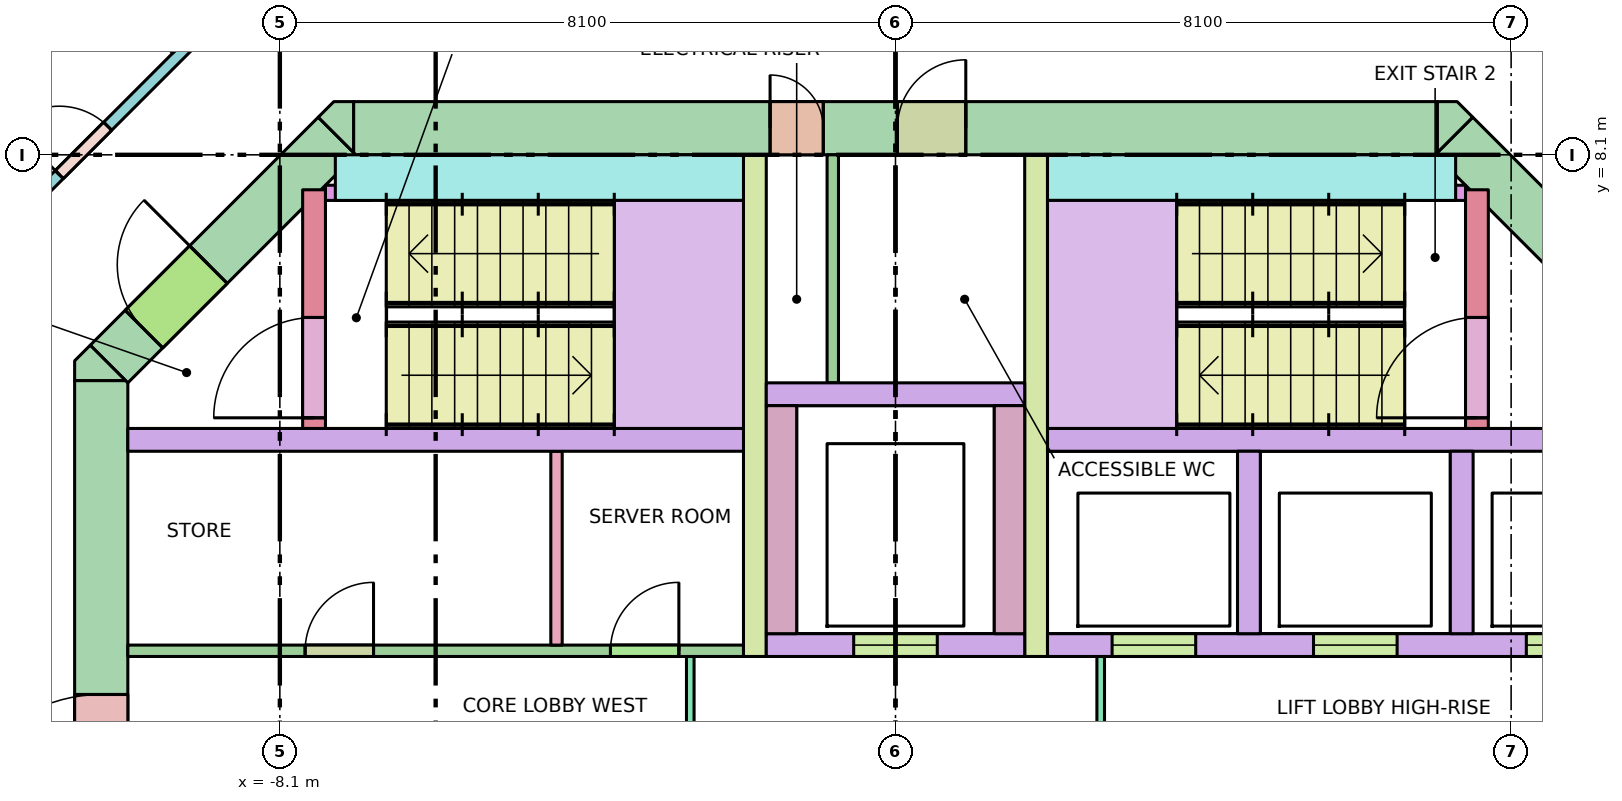
"""IFC4 building model, lengths in metres.
Left out: names, types, materials, properties, quantities, classifications, styles, units other than length and angle.
Written with IfcOpenShell. Run it as: python <this file> out.ifc"""

import sys

from ifc_helpers import new_model, si_unit, direction, frame, frame_2d, origin, place, context, subcontext, project, spatial, polyline, rectangle, outline, extrude, element, fill, save


model = new_model("IFC4")
c1 = context("Model", 3, precision=1e-05, world=origin(), true_north=direction((0.0, 1.0)))
c2 = subcontext(c1, "Body", "Model", "MODEL_VIEW")
j1 = project(units=[si_unit("LENGTHUNIT", "METRE"), si_unit("PLANEANGLEUNIT", "RADIAN")], contexts=[c1])
p1 = place(None, origin())
s1 = spatial("IfcSite", under=j1, at=p1, CompositionType="ELEMENT")
p2 = place(p1, origin())
s2 = spatial("IfcBuilding", under=s1, at=p2, CompositionType="ELEMENT")
p3 = place(p2, frame((0.0, 0.0, 192.8)))
s3 = spatial("IfcBuildingStorey", under=s2, at=p3, CompositionType="ELEMENT", Elevation=192.8)
p4 = place(p3, frame((-7.13, 8.45, -0.28), z_axis=(0.0, 0.0, 1.0), x_axis=(1.0, 0.0, 0.0)))
e1 = element("IfcWall", 1, at=p4, inside=s3, PredefinedType="SHEAR", context=c2, shape_type="SweptSolid", body=[
    extrude(rectangle(XDim=14.26, YDim=0.7, at=frame_2d((7.13, 0.0))), origin(), (0.0, 0.0, 1.0), 3.7),
])
p5 = place(p4, frame((5.48, 0.0, 0.28)))
e2 = element("IfcOpeningElement", 2, at=p5, cuts=e1, PredefinedType="OPENING", context=c2, shape_type="SweptSolid", body=[
    extrude(rectangle(XDim=0.7, YDim=2.1, at=frame_2d((0.35, 1.05))), frame((0.0, 0.36, 0.0), z_axis=(0.0, -1.0, 0.0), x_axis=(1.0, 0.0, 0.0)), (0.0, 0.0, 1.0), 0.72),
])
p6 = place(p4, frame((7.155, 0.0, 0.28)))
e3 = element("IfcOpeningElement", 3, at=p6, cuts=e1, PredefinedType="OPENING", context=c2, shape_type="SweptSolid", body=[
    extrude(rectangle(XDim=0.9, YDim=2.1, at=frame_2d((0.45, 1.05))), frame((0.0, 0.36, 0.0), z_axis=(0.0, -1.0, 0.0), x_axis=(1.0, 0.0, 0.0)), (0.0, 0.0, 1.0), 0.72),
])
p7 = place(p3, frame((-10.45, -5.13, -0.28), z_axis=(0.0, 0.0, 1.0), x_axis=(0.0, 1.0, 0.0)))
e4 = element("IfcWall", 4, at=p7, inside=s3, PredefinedType="SHEAR", context=c2, shape_type="SweptSolid", body=[
    extrude(rectangle(XDim=10.26, YDim=0.7, at=frame_2d((5.13, 0.0))), origin(), (0.0, 0.0, 1.0), 3.7),
])
p8 = place(p7, frame((4.13, 0.0, 0.28)))
e5 = element("IfcOpeningElement", 5, at=p8, cuts=e4, PredefinedType="OPENING", context=c2, shape_type="SweptSolid", body=[
    extrude(rectangle(XDim=2.0, YDim=2.1, at=frame_2d((1.0, 1.05))), frame((0.0, 0.36, 0.0), z_axis=(0.0, -1.0, 0.0), x_axis=(1.0, 0.0, 0.0)), (0.0, 0.0, 1.0), 0.72),
])
p9 = place(p3, frame((-10.347, 5.347, -0.28), z_axis=(0.0, 0.0, 1.0), x_axis=(0.707106781187, 0.707106781187, 0.0)))
e6 = element("IfcWall", 6, at=p9, inside=s3, PredefinedType="SHEAR", context=c2, shape_type="SweptSolid", body=[
    extrude(rectangle(XDim=4.243, YDim=0.7, at=frame_2d((2.121, 0.0))), origin(), (0.0, 0.0, 1.0), 3.7),
])
p10 = place(p9, frame((0.65, 0.0, 0.28)))
e7 = element("IfcOpeningElement", 7, at=p10, cuts=e6, PredefinedType="OPENING", context=c2, shape_type="SweptSolid", body=[
    extrude(rectangle(XDim=1.2, YDim=2.1, at=frame_2d((0.6, 1.05))), frame((0.0, 0.36, 0.0), z_axis=(0.0, -1.0, 0.0), x_axis=(1.0, 0.0, 0.0)), (0.0, 0.0, 1.0), 0.72),
])
p11 = place(p3, frame((7.347, 8.347, -0.28), z_axis=(0.0, 0.0, 1.0), x_axis=(0.707106781187, -0.707106781187, 0.0)))
e8 = element("IfcWall", 8, at=p11, inside=s3, PredefinedType="SHEAR", context=c2, shape_type="SweptSolid", body=[
    extrude(rectangle(XDim=4.243, YDim=0.7, at=frame_2d((2.121, 0.0))), origin(), (0.0, 0.0, 1.0), 3.7),
])
p12 = place(p11, frame((2.393, 0.0, 0.28)))
e9 = element("IfcOpeningElement", 9, at=p12, cuts=e8, PredefinedType="OPENING", context=c2, shape_type="SweptSolid", body=[
    extrude(rectangle(XDim=1.2, YDim=2.1, at=frame_2d((0.6, 1.05))), frame((0.0, 0.36, 0.0), z_axis=(0.0, -1.0, 0.0), x_axis=(1.0, 0.0, 0.0)), (0.0, 0.0, 1.0), 0.72),
])
p13 = place(p3, frame((0.0, 0.0, -0.28)))
e10 = element("IfcWall", 10, at=p13, inside=s3, PredefinedType="SHEAR", context=c2, shape_type="SweptSolid", body=[
    extrude(outline(polyline([(-10.595, 5.595), (-10.595, 5.595), (-10.595, 5.595), (-10.13, 5.13), (-10.8, 5.13), (-10.8, 5.13), (-10.8, 5.39), (-10.595, 5.595)])), origin(), (0.0, 0.0, 1.0), 3.7),
])
p14 = place(p3, frame((0.0, 0.0, -0.28)))
e11 = element("IfcWall", 11, at=p14, inside=s3, PredefinedType="SHEAR", context=c2, shape_type="SweptSolid", body=[
    extrude(outline(polyline([(-7.39, 8.8), (-7.13, 8.8), (-7.13, 8.8), (-7.13, 8.13), (-7.595, 8.595), (-7.595, 8.595), (-7.595, 8.595), (-7.39, 8.8)])), origin(), (0.0, 0.0, 1.0), 3.7),
])
p15 = place(p3, frame((0.0, 0.0, -0.28)))
e12 = element("IfcWall", 12, at=p15, inside=s3, PredefinedType="SHEAR", context=c2, shape_type="SweptSolid", body=[
    extrude(outline(polyline([(7.39, 8.8), (7.595, 8.595), (7.595, 8.595), (7.595, 8.595), (7.13, 8.13), (7.13, 8.8), (7.13, 8.8), (7.39, 8.8)])), origin(), (0.0, 0.0, 1.0), 3.7),
])
for number, where, z_axis, x_axis in (
    (13, (-10.1, 4.35, 0.0), (0.0, 0.0, 1.0), (1.0, 0.0, 0.0)),
    (14, (2.0, 4.35, 0.0), (0.0, 0.0, 1.0), (1.0, 0.0, 0.0)),
):
    element("IfcWall", number, at=place(p3, frame(where, z_axis=z_axis, x_axis=x_axis)), inside=s3, PredefinedType="SOLIDWALL", context=c2, shape_type="SweptSolid", body=[
        extrude(rectangle(XDim=8.1, YDim=0.3, at=frame_2d((4.05, 0.0))), origin(), (0.0, 0.0, 1.0), 3.42),
    ])
p16 = place(p3, frame((2.0, 1.65, 0.0), z_axis=(0.0, 0.0, 1.0), x_axis=(1.0, 0.0, 0.0)))
e15 = element("IfcWall", 15, at=p16, inside=s3, PredefinedType="SOLIDWALL", context=c2, shape_type="SweptSolid", body=[
    extrude(rectangle(XDim=8.1, YDim=0.3, at=frame_2d((4.05, 0.0))), origin(), (0.0, 0.0, 1.0), 3.42),
])
p17 = place(p16, frame((0.85, 0.0, 0.0)))
e16 = element("IfcOpeningElement", 16, at=p17, cuts=e15, PredefinedType="OPENING", context=c2, shape_type="SweptSolid", body=[
    extrude(rectangle(XDim=1.1, YDim=2.1, at=frame_2d((0.55, 1.05))), frame((0.0, 0.16, 0.0), z_axis=(0.0, -1.0, 0.0), x_axis=(1.0, 0.0, 0.0)), (0.0, 0.0, 1.0), 0.32),
])
p18 = place(p16, frame((3.5, 0.0, 0.0)))
e17 = element("IfcOpeningElement", 17, at=p18, cuts=e15, PredefinedType="OPENING", context=c2, shape_type="SweptSolid", body=[
    extrude(rectangle(XDim=1.1, YDim=2.1, at=frame_2d((0.55, 1.05))), frame((0.0, 0.16, 0.0), z_axis=(0.0, -1.0, 0.0), x_axis=(1.0, 0.0, 0.0)), (0.0, 0.0, 1.0), 0.32),
])
p19 = place(p16, frame((6.3, 0.0, 0.0)))
e18 = element("IfcOpeningElement", 18, at=p19, cuts=e15, PredefinedType="OPENING", context=c2, shape_type="SweptSolid", body=[
    extrude(rectangle(XDim=1.1, YDim=2.1, at=frame_2d((0.55, 1.05))), frame((0.0, 0.16, 0.0), z_axis=(0.0, -1.0, 0.0), x_axis=(1.0, 0.0, 0.0)), (0.0, 0.0, 1.0), 0.32),
])
for number, where, z_axis, x_axis in (
    (19, (4.65, 1.8, 0.0), (0.0, 0.0, 1.0), (0.0, 1.0, 0.0)),
    (20, (7.45, 1.8, 0.0), (0.0, 0.0, 1.0), (0.0, 1.0, 0.0)),
):
    element("IfcWall", number, at=place(p3, frame(where, z_axis=z_axis, x_axis=x_axis)), inside=s3, PredefinedType="SOLIDWALL", context=c2, shape_type="SweptSolid", body=[
        extrude(rectangle(XDim=2.4, YDim=0.3, at=frame_2d((1.2, 0.0))), origin(), (0.0, 0.0, 1.0), 3.42),
    ])
for number, where, z_axis, x_axis in (
    (21, (-1.85, 1.5, 0.0), (0.0, 0.0, 1.0), (0.0, 1.0, 0.0)),
    (22, (1.85, 1.5, 0.0), (0.0, 0.0, 1.0), (0.0, 1.0, 0.0)),
):
    element("IfcWall", number, at=place(p3, frame(where, z_axis=z_axis, x_axis=x_axis)), inside=s3, PredefinedType="SHEAR", context=c2, shape_type="SweptSolid", body=[
        extrude(rectangle(XDim=6.6, YDim=0.3, at=frame_2d((3.3, 0.0))), origin(), (0.0, 0.0, 1.0), 3.42),
    ])
p20 = place(p3, frame((-1.7, 1.65, 0.0), z_axis=(0.0, 0.0, 1.0), x_axis=(1.0, 0.0, 0.0)))
e23 = element("IfcWall", 23, at=p20, inside=s3, PredefinedType="SOLIDWALL", context=c2, shape_type="SweptSolid", body=[
    extrude(rectangle(XDim=3.4, YDim=0.3, at=frame_2d((1.7, 0.0))), origin(), (0.0, 0.0, 1.0), 3.42),
])
p21 = place(p20, frame((1.15, 0.0, 0.0)))
e24 = element("IfcOpeningElement", 24, at=p21, cuts=e23, PredefinedType="OPENING", context=c2, shape_type="SweptSolid", body=[
    extrude(rectangle(XDim=1.1, YDim=2.1, at=frame_2d((0.55, 1.05))), frame((0.0, 0.16, 0.0), z_axis=(0.0, -1.0, 0.0), x_axis=(1.0, 0.0, 0.0)), (0.0, 0.0, 1.0), 0.32),
])
for number, where, z_axis, x_axis in (
    (25, (-1.5, 1.8, 0.0), (0.0, 0.0, 1.0), (0.0, 1.0, 0.0)),
    (26, (1.5, 1.8, 0.0), (0.0, 0.0, 1.0), (0.0, 1.0, 0.0)),
):
    element("IfcWall", number, at=place(p3, frame(where, z_axis=z_axis, x_axis=x_axis)), inside=s3, PredefinedType="SOLIDWALL", context=c2, shape_type="SweptSolid", body=[
        extrude(rectangle(XDim=3.0, YDim=0.4, at=frame_2d((1.5, 0.0))), origin(), (0.0, 0.0, 1.0), 3.42),
    ])
p22 = place(p3, frame((-1.7, 4.95, 0.0), z_axis=(0.0, 0.0, 1.0), x_axis=(1.0, 0.0, 0.0)))
e27 = element("IfcWall", 27, at=p22, inside=s3, PredefinedType="SOLIDWALL", context=c2, shape_type="SweptSolid", body=[
    extrude(rectangle(XDim=3.4, YDim=0.3, at=frame_2d((1.7, 0.0))), origin(), (0.0, 0.0, 1.0), 3.42),
])
p23 = place(p3, frame((-7.65, 4.5, 0.0), z_axis=(0.0, 0.0, 1.0), x_axis=(0.0, 1.0, 0.0)))
e28 = element("IfcWall", 28, at=p23, inside=s3, PredefinedType="SHEAR", context=c2, shape_type="SweptSolid", body=[
    extrude(rectangle(XDim=3.14, YDim=0.3, at=frame_2d((1.57, 0.0))), origin(), (0.0, 0.0, 1.0), 3.42),
])
p24 = place(p23, frame((0.14, 0.0, 0.0)))
e29 = element("IfcOpeningElement", 29, at=p24, cuts=e28, PredefinedType="OPENING", context=c2, shape_type="SweptSolid", body=[
    extrude(rectangle(XDim=1.32, YDim=2.1, at=frame_2d((0.66, 1.05))), frame((0.0, 0.16, 0.0), z_axis=(0.0, -1.0, 0.0), x_axis=(1.0, 0.0, 0.0)), (0.0, 0.0, 1.0), 0.32),
])
p25 = place(p3, frame((-7.37, 7.8, 0.0), z_axis=(0.0, 0.0, 1.0), x_axis=(1.0, 0.0, 0.0)))
e30 = element("IfcWall", 30, at=p25, inside=s3, PredefinedType="SHEAR", context=c2, shape_type="SweptSolid", body=[
    extrude(rectangle(XDim=5.37, YDim=0.6, at=frame_2d((2.685, 0.0))), origin(), (0.0, 0.0, 1.0), 3.42),
])
p26 = place(p3, frame((7.65, 4.5, 0.0), z_axis=(0.0, 0.0, 1.0), x_axis=(0.0, 1.0, 0.0)))
e31 = element("IfcWall", 31, at=p26, inside=s3, PredefinedType="SHEAR", context=c2, shape_type="SweptSolid", body=[
    extrude(rectangle(XDim=3.14, YDim=0.3, at=frame_2d((1.57, 0.0))), origin(), (0.0, 0.0, 1.0), 3.42),
])
p27 = place(p26, frame((0.14, 0.0, 0.0)))
e32 = element("IfcOpeningElement", 32, at=p27, cuts=e31, PredefinedType="OPENING", context=c2, shape_type="SweptSolid", body=[
    extrude(rectangle(XDim=1.32, YDim=2.1, at=frame_2d((0.66, 1.05))), frame((0.0, 0.16, 0.0), z_axis=(0.0, -1.0, 0.0), x_axis=(1.0, 0.0, 0.0)), (0.0, 0.0, 1.0), 0.32),
])
p28 = place(p3, frame((2.0, 7.8, 0.0), z_axis=(0.0, 0.0, 1.0), x_axis=(1.0, 0.0, 0.0)))
e33 = element("IfcWall", 33, at=p28, inside=s3, PredefinedType="SHEAR", context=c2, shape_type="SweptSolid", body=[
    extrude(rectangle(XDim=5.37, YDim=0.6, at=frame_2d((2.685, 0.0))), origin(), (0.0, 0.0, 1.0), 3.42),
])
for number, where, z_axis, x_axis in (
    (34, (-7.5, 7.6, 0.0), (0.0, 0.0, 1.0), (1.0, 0.0, 0.0)),
    (35, (6.9, 7.6, 0.0), (0.0, 0.0, 1.0), (1.0, 0.0, 0.0)),
):
    element("IfcWall", number, at=place(p3, frame(where, z_axis=z_axis, x_axis=x_axis)), inside=s3, PredefinedType="SHEAR", context=c2, shape_type="SweptSolid", body=[
        extrude(rectangle(XDim=0.6, YDim=0.2, at=frame_2d((0.3, 0.0))), origin(), (0.0, 0.0, 1.0), 3.42),
    ])
p29 = place(p3, frame((-2.7, -1.5, 0.0), z_axis=(0.0, 0.0, 1.0), x_axis=(0.0, 1.0, 0.0)))
e36 = element("IfcWall", 36, at=p29, inside=s3, PredefinedType="PARTITIONING", context=c2, shape_type="SweptSolid", body=[
    extrude(rectangle(XDim=3.0, YDim=0.1, at=frame_2d((1.5, 0.0))), origin(), (0.0, 0.0, 1.0), 3.42),
])
p30 = place(p29, frame((0.9, 0.0, 0.0)))
e37 = element("IfcOpeningElement", 37, at=p30, cuts=e36, PredefinedType="OPENING", context=c2, shape_type="SweptSolid", body=[
    extrude(rectangle(XDim=1.2, YDim=2.1, at=frame_2d((0.6, 1.05))), frame((0.0, 0.06, 0.0), z_axis=(0.0, -1.0, 0.0), x_axis=(1.0, 0.0, 0.0)), (0.0, 0.0, 1.0), 0.12),
])
p31 = place(p3, frame((2.7, -1.5, 0.0), z_axis=(0.0, 0.0, 1.0), x_axis=(0.0, 1.0, 0.0)))
e38 = element("IfcWall", 38, at=p31, inside=s3, PredefinedType="PARTITIONING", context=c2, shape_type="SweptSolid", body=[
    extrude(rectangle(XDim=3.0, YDim=0.1, at=frame_2d((1.5, 0.0))), origin(), (0.0, 0.0, 1.0), 3.42),
])
p32 = place(p31, frame((0.9, 0.0, 0.0)))
e39 = element("IfcOpeningElement", 39, at=p32, cuts=e38, PredefinedType="OPENING", context=c2, shape_type="SweptSolid", body=[
    extrude(rectangle(XDim=1.2, YDim=2.1, at=frame_2d((0.6, 1.05))), frame((0.0, 0.06, 0.0), z_axis=(0.0, -1.0, 0.0), x_axis=(1.0, 0.0, 0.0)), (0.0, 0.0, 1.0), 0.12),
])
p33 = place(p3, frame((-0.825, 5.1, 0.0), z_axis=(0.0, 0.0, 1.0), x_axis=(0.0, 1.0, 0.0)))
e40 = element("IfcWall", 40, at=p33, inside=s3, PredefinedType="PARTITIONING", context=c2, shape_type="SweptSolid", body=[
    extrude(rectangle(XDim=3.0, YDim=0.15, at=frame_2d((1.5, 0.0))), origin(), (0.0, 0.0, 1.0), 3.42),
])
p34 = place(p3, frame((-4.46, 1.65, 0.0), z_axis=(0.0, 0.0, 1.0), x_axis=(0.0, 1.0, 0.0)))
e41 = element("IfcWall", 41, at=p34, inside=s3, PredefinedType="PARTITIONING", context=c2, shape_type="SweptSolid", body=[
    extrude(rectangle(XDim=2.55, YDim=0.15, at=frame_2d((1.275, 0.0))), origin(), (0.0, 0.0, 1.0), 3.42),
])
p35 = place(p3, frame((-10.1, 1.575, 0.0), z_axis=(0.0, 0.0, 1.0), x_axis=(1.0, 0.0, 0.0)))
e42 = element("IfcWall", 42, at=p35, inside=s3, PredefinedType="PARTITIONING", context=c2, shape_type="SweptSolid", body=[
    extrude(rectangle(XDim=8.1, YDim=0.15, at=frame_2d((4.05, 0.0))), origin(), (0.0, 0.0, 1.0), 3.42),
])
p36 = place(p35, frame((2.333, 0.0, 0.0)))
e43 = element("IfcOpeningElement", 43, at=p36, cuts=e42, PredefinedType="OPENING", context=c2, shape_type="SweptSolid", body=[
    extrude(rectangle(XDim=0.9, YDim=2.1, at=frame_2d((0.45, 1.05))), frame((0.0, 0.085, 0.0), z_axis=(0.0, -1.0, 0.0), x_axis=(1.0, 0.0, 0.0)), (0.0, 0.0, 1.0), 0.17),
])
p37 = place(p35, frame((6.35, 0.0, 0.0)))
e44 = element("IfcOpeningElement", 44, at=p37, cuts=e42, PredefinedType="OPENING", context=c2, shape_type="SweptSolid", body=[
    extrude(rectangle(XDim=0.9, YDim=2.1, at=frame_2d((0.45, 1.05))), frame((0.0, 0.085, 0.0), z_axis=(0.0, -1.0, 0.0), x_axis=(1.0, 0.0, 0.0)), (0.0, 0.0, 1.0), 0.17),
])
p38 = place(p3, frame((-12.638, 6.204, 0.0), z_axis=(0.0, 0.0, 1.0), x_axis=(0.707106781187, 0.707106781187, 0.0)))
e45 = element("IfcWall", 45, at=p38, inside=s3, PredefinedType="PARTITIONING", context=c2, shape_type="SweptSolid", body=[
    extrude(rectangle(XDim=6.271, YDim=0.15, at=frame_2d((3.135, 0.0))), origin(), (0.0, 0.0, 1.0), 2.62),
])
p39 = place(p38, frame((4.935, 0.0, 0.0)))
e46 = element("IfcOpeningElement", 46, at=p39, cuts=e45, PredefinedType="OPENING", context=c2, shape_type="SweptSolid", body=[
    extrude(rectangle(XDim=0.9, YDim=2.1, at=frame_2d((0.45, 1.05))), frame((0.0, 0.085, 0.0), z_axis=(0.0, -1.0, 0.0), x_axis=(1.0, 0.0, 0.0)), (0.0, 0.0, 1.0), 0.17),
])
p40 = place(p38, frame((2.314, 0.0, 0.0)))
e47 = element("IfcOpeningElement", 47, at=p40, cuts=e45, PredefinedType="OPENING", context=c2, shape_type="SweptSolid", body=[
    extrude(rectangle(XDim=0.9, YDim=2.1, at=frame_2d((0.45, 1.05))), frame((0.0, 0.085, 0.0), z_axis=(0.0, -1.0, 0.0), x_axis=(1.0, 0.0, 0.0)), (0.0, 0.0, 1.0), 0.17),
])
p41 = place(p3, frame((8.204, 10.638, 0.0), z_axis=(0.0, 0.0, 1.0), x_axis=(0.707106781187, -0.707106781187, 0.0)))
e48 = element("IfcWall", 48, at=p41, inside=s3, PredefinedType="PARTITIONING", context=c2, shape_type="SweptSolid", body=[
    extrude(rectangle(XDim=6.271, YDim=0.15, at=frame_2d((3.135, 0.0))), origin(), (0.0, 0.0, 1.0), 2.62),
])
p42 = place(p3, frame((-9.474, 9.474, 0.0), z_axis=(0.0, 0.0, 1.0), x_axis=(-0.707106781187, 0.707106781187, 0.0)))
e49 = element("IfcWall", 49, at=p42, inside=s3, PredefinedType="PARTITIONING", context=c2, shape_type="SweptSolid", body=[
    extrude(rectangle(XDim=5.938, YDim=0.1, at=frame_2d((2.969, 0.0))), origin(), (0.0, 0.0, 1.0), 2.62),
])
p43 = place(p17, origin())
e50 = element("IfcDoor", 50, at=p43, inside=s3, OperationType="DOUBLE_DOOR_SLIDING", PredefinedType="DOOR", context=c2, shape_type="SweptSolid", body=[
    extrude(rectangle(XDim=1.1, YDim=2.1, at=frame_2d((0.55, 1.05))), frame((0.0, 0.025, 0.0), z_axis=(0.0, -1.0, 0.0), x_axis=(1.0, 0.0, 0.0)), (0.0, 0.0, 1.0), 0.05),
])
fill(e16, e50)
p44 = place(p18, origin())
e51 = element("IfcDoor", 51, at=p44, inside=s3, OperationType="DOUBLE_DOOR_SLIDING", PredefinedType="DOOR", context=c2, shape_type="SweptSolid", body=[
    extrude(rectangle(XDim=1.1, YDim=2.1, at=frame_2d((0.55, 1.05))), frame((0.0, 0.025, 0.0), z_axis=(0.0, -1.0, 0.0), x_axis=(1.0, 0.0, 0.0)), (0.0, 0.0, 1.0), 0.05),
])
fill(e17, e51)
p45 = place(p19, origin())
e52 = element("IfcDoor", 52, at=p45, inside=s3, OperationType="DOUBLE_DOOR_SLIDING", PredefinedType="DOOR", context=c2, shape_type="SweptSolid", body=[
    extrude(rectangle(XDim=1.1, YDim=2.1, at=frame_2d((0.55, 1.05))), frame((0.0, 0.025, 0.0), z_axis=(0.0, -1.0, 0.0), x_axis=(1.0, 0.0, 0.0)), (0.0, 0.0, 1.0), 0.05),
])
fill(e18, e52)
p46 = place(p21, origin())
e53 = element("IfcDoor", 53, at=p46, inside=s3, OperationType="DOUBLE_DOOR_SLIDING", PredefinedType="DOOR", context=c2, shape_type="SweptSolid", body=[
    extrude(rectangle(XDim=1.1, YDim=2.1, at=frame_2d((0.55, 1.05))), frame((0.0, 0.025, 0.0), z_axis=(0.0, -1.0, 0.0), x_axis=(1.0, 0.0, 0.0)), (0.0, 0.0, 1.0), 0.05),
])
fill(e24, e53)
p47 = place(p24, origin())
e54 = element("IfcDoor", 54, at=p47, inside=s3, OperationType="DOUBLE_DOOR_SINGLE_SWING", PredefinedType="DOOR", context=c2, shape_type="SweptSolid", body=[
    extrude(rectangle(XDim=1.32, YDim=2.1, at=frame_2d((0.66, 1.05))), frame((0.0, 0.025, 0.0), z_axis=(0.0, -1.0, 0.0), x_axis=(1.0, 0.0, 0.0)), (0.0, 0.0, 1.0), 0.05),
])
fill(e29, e54)
p48 = place(p10, origin())
e55 = element("IfcDoor", 55, at=p48, inside=s3, OperationType="SINGLE_SWING_RIGHT", PredefinedType="DOOR", context=c2, shape_type="SweptSolid", body=[
    extrude(rectangle(XDim=1.2, YDim=2.1, at=frame_2d((0.6, 1.05))), frame((0.0, 0.025, 0.0), z_axis=(0.0, -1.0, 0.0), x_axis=(1.0, 0.0, 0.0)), (0.0, 0.0, 1.0), 0.05),
])
fill(e7, e55)
p49 = place(p27, origin())
e56 = element("IfcDoor", 56, at=p49, inside=s3, OperationType="DOUBLE_DOOR_SINGLE_SWING", PredefinedType="DOOR", context=c2, shape_type="SweptSolid", body=[
    extrude(rectangle(XDim=1.32, YDim=2.1, at=frame_2d((0.66, 1.05))), frame((0.0, 0.025, 0.0), z_axis=(0.0, -1.0, 0.0), x_axis=(1.0, 0.0, 0.0)), (0.0, 0.0, 1.0), 0.05),
])
fill(e32, e56)
p50 = place(p8, origin())
e57 = element("IfcDoor", 57, at=p50, inside=s3, OperationType="DOUBLE_DOOR_SINGLE_SWING", PredefinedType="DOOR", context=c2, shape_type="SweptSolid", body=[
    extrude(rectangle(XDim=2.0, YDim=2.1, at=frame_2d((1.0, 1.05))), frame((0.0, 0.025, 0.0), z_axis=(0.0, -1.0, 0.0), x_axis=(1.0, 0.0, 0.0)), (0.0, 0.0, 1.0), 0.05),
])
fill(e5, e57)
p51 = place(p5, origin())
e58 = element("IfcDoor", 58, at=p51, inside=s3, OperationType="SINGLE_SWING_LEFT", PredefinedType="DOOR", context=c2, shape_type="SweptSolid", body=[
    extrude(rectangle(XDim=0.7, YDim=2.1, at=frame_2d((0.35, 1.05))), frame((0.0, 0.025, 0.0), z_axis=(0.0, -1.0, 0.0), x_axis=(1.0, 0.0, 0.0)), (0.0, 0.0, 1.0), 0.05),
])
fill(e2, e58)
p52 = place(p6, origin())
e59 = element("IfcDoor", 59, at=p52, inside=s3, OperationType="SINGLE_SWING_RIGHT", PredefinedType="DOOR", context=c2, shape_type="SweptSolid", body=[
    extrude(rectangle(XDim=0.9, YDim=2.1, at=frame_2d((0.45, 1.05))), frame((0.0, 0.025, 0.0), z_axis=(0.0, -1.0, 0.0), x_axis=(1.0, 0.0, 0.0)), (0.0, 0.0, 1.0), 0.05),
])
fill(e3, e59)
p53 = place(p36, origin())
e60 = element("IfcDoor", 60, at=p53, inside=s3, OperationType="SINGLE_SWING_RIGHT", PredefinedType="DOOR", context=c2, shape_type="SweptSolid", body=[
    extrude(rectangle(XDim=0.9, YDim=2.1, at=frame_2d((0.45, 1.05))), frame((0.0, 0.025, 0.0), z_axis=(0.0, -1.0, 0.0), x_axis=(1.0, 0.0, 0.0)), (0.0, 0.0, 1.0), 0.05),
])
fill(e43, e60)
p54 = place(p37, origin())
e61 = element("IfcDoor", 61, at=p54, inside=s3, OperationType="SINGLE_SWING_RIGHT", PredefinedType="DOOR", context=c2, shape_type="SweptSolid", body=[
    extrude(rectangle(XDim=0.9, YDim=2.1, at=frame_2d((0.45, 1.05))), frame((0.0, 0.025, 0.0), z_axis=(0.0, -1.0, 0.0), x_axis=(1.0, 0.0, 0.0)), (0.0, 0.0, 1.0), 0.05),
])
fill(e44, e61)
p55 = place(p40, origin())
e62 = element("IfcDoor", 62, at=p55, inside=s3, OperationType="SINGLE_SWING_LEFT", PredefinedType="DOOR", context=c2, shape_type="SweptSolid", body=[
    extrude(rectangle(XDim=0.9, YDim=2.1, at=frame_2d((0.45, 1.05))), frame((0.0, 0.025, 0.0), z_axis=(0.0, -1.0, 0.0), x_axis=(1.0, 0.0, 0.0)), (0.0, 0.0, 1.0), 0.05),
])
fill(e47, e62)
save(model, sys.argv[1])
